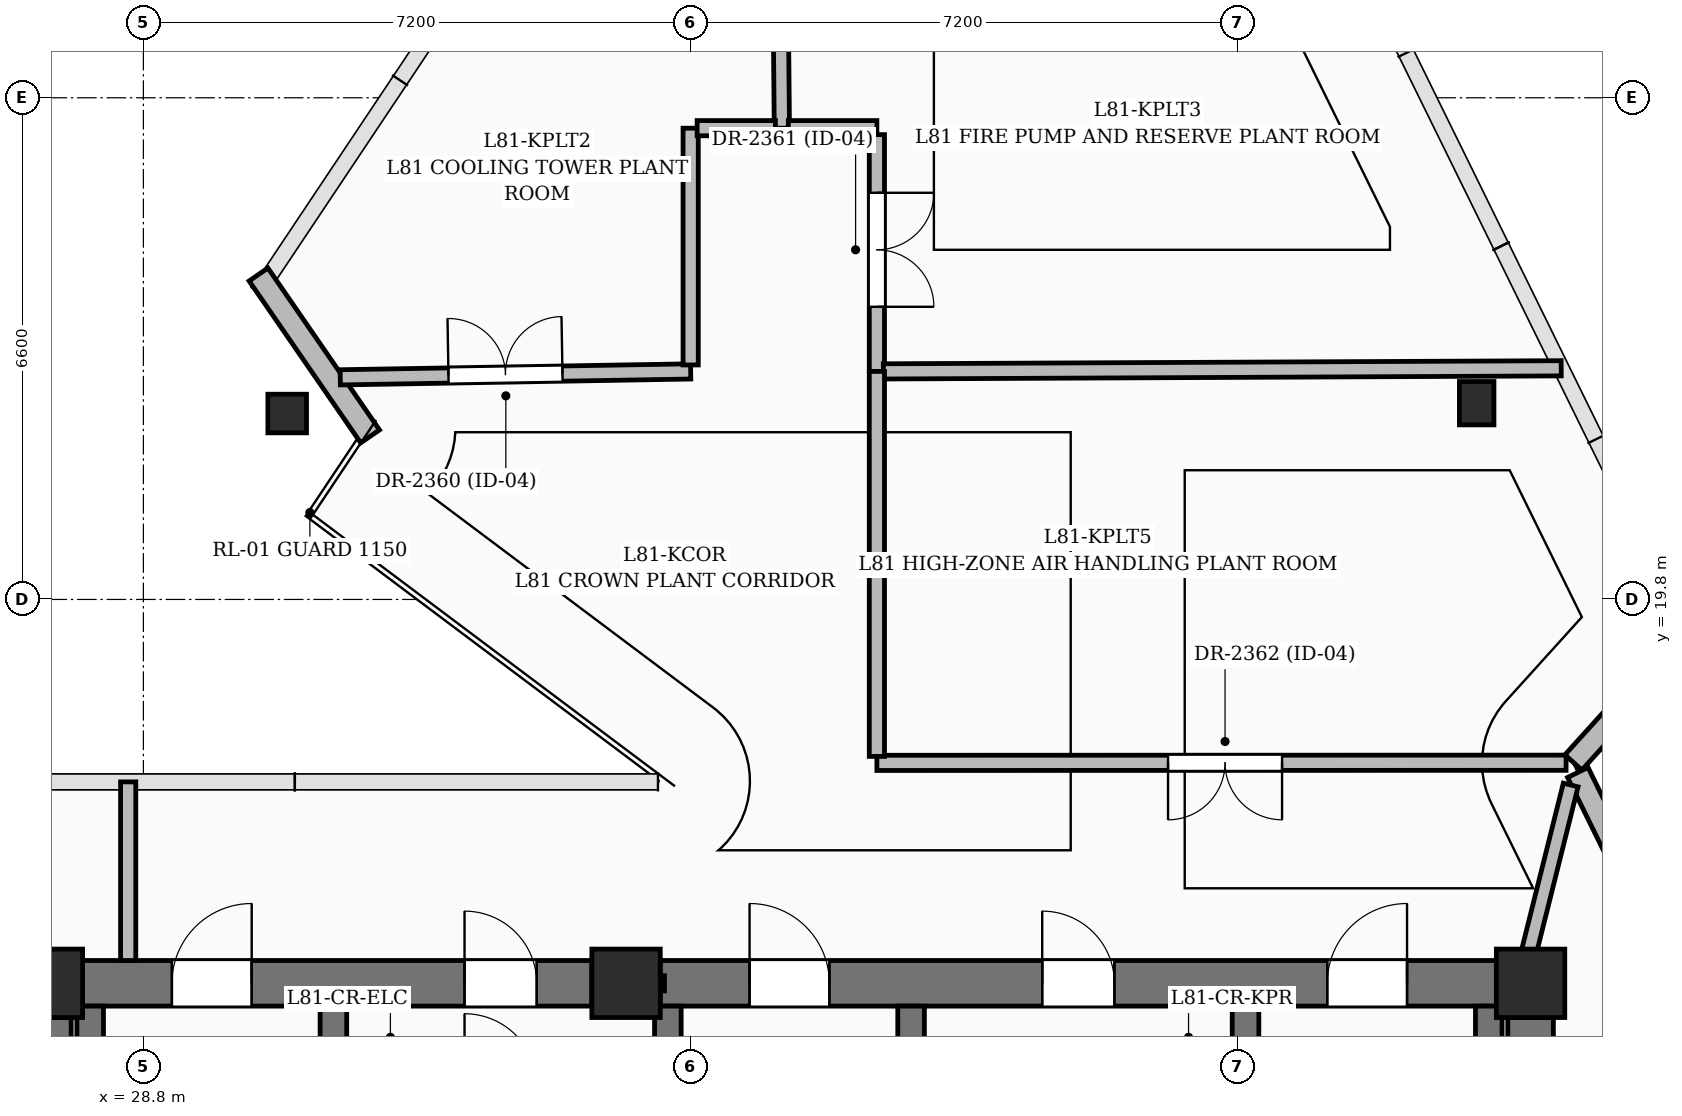
"""IFC4 building model, lengths in metres.
Left out: names, types, materials, properties, quantities, classifications, styles, units other than length and angle.
Written with IfcOpenShell. Run it as: python <this file> out.ifc"""

import sys

from ifc_helpers import new_model, si_unit, direction, frame, frame_2d, origin, origin_2d, place, context, subcontext, project, spatial, rectangle, hollow_circle, i_section, extrude, element, fill, save


model = new_model("IFC4")
c1 = context("Model", 3, precision=1e-05, world=origin(), true_north=direction((0.0, 1.0)))
c2 = subcontext(c1, "Body", "Model", "MODEL_VIEW")
j1 = project(units=[si_unit("LENGTHUNIT", "METRE"), si_unit("PLANEANGLEUNIT", "RADIAN")], contexts=[c1])
p1 = place(None, origin())
s1 = spatial("IfcSite", under=j1, at=p1, CompositionType="ELEMENT")
p2 = place(p1, origin())
s2 = spatial("IfcBuilding", under=s1, at=p2, CompositionType="ELEMENT")
p3 = place(p2, frame((0.0, 0.0, 314.5)))
s3 = spatial("IfcBuildingStorey", under=s2, at=p3, CompositionType="ELEMENT", Elevation=314.5)
for number, where, z_axis, x_axis in (
    (1, (27.55, 14.75, 0.0), (0.0, 0.0, 1.0), (1.0, 0.0, 0.0)),
    (2, (35.15, 14.75, 0.0), (0.0, 0.0, 1.0), (1.0, 0.0, 0.0)),
    (3, (47.05, 14.75, 0.0), (0.0, 0.0, 1.0), (1.0, 0.0, 0.0)),
):
    element("IfcColumn", number, at=place(p3, frame(where, z_axis=z_axis, x_axis=x_axis)), inside=s3, PredefinedType="COLUMN", context=c2, shape_type="SweptSolid", body=[
        extrude(rectangle(XDim=0.9, YDim=0.9, at=origin_2d()), origin(), (0.0, 0.0, 1.0), 4.0),
    ])
p4 = place(p3, frame((28.0, 14.75, 0.0), z_axis=(0.0, 0.0, 1.0), x_axis=(1.0, 0.0, 0.0)))
e4 = element("IfcWall", 4, at=p4, inside=s3, PredefinedType="SHEAR", context=c2, shape_type="SweptSolid", body=[
    extrude(rectangle(XDim=6.7, YDim=0.6, at=frame_2d((3.35, 0.0))), origin(), (0.0, 0.0, 1.0), 4.0),
])
p5 = place(p4, frame((1.175, 0.0, 0.0)))
e5 = element("IfcOpeningElement", 5, at=p5, cuts=e4, PredefinedType="OPENING", context=c2, shape_type="SweptSolid", body=[
    extrude(rectangle(XDim=1.05, YDim=2.15, at=frame_2d((0.525, 1.075))), frame((0.0, 0.31, 0.0), z_axis=(0.0, -1.0, 0.0), x_axis=(1.0, 0.0, 0.0)), (0.0, 0.0, 1.0), 0.62),
])
p6 = place(p4, frame((5.025, 0.0, 0.0)))
e6 = element("IfcOpeningElement", 6, at=p6, cuts=e4, PredefinedType="OPENING", context=c2, shape_type="SweptSolid", body=[
    extrude(rectangle(XDim=0.95, YDim=2.15, at=frame_2d((0.475, 1.075))), frame((0.0, 0.31, 0.0), z_axis=(0.0, -1.0, 0.0), x_axis=(1.0, 0.0, 0.0)), (0.0, 0.0, 1.0), 0.62),
])
p7 = place(p3, frame((35.6, 14.75, 0.0), z_axis=(0.0, 0.0, 1.0), x_axis=(1.0, 0.0, 0.0)))
e7 = element("IfcWall", 7, at=p7, inside=s3, PredefinedType="SHEAR", context=c2, shape_type="SweptSolid", body=[
    extrude(rectangle(XDim=11.0, YDim=0.6, at=frame_2d((5.5, 0.0))), origin(), (0.0, 0.0, 1.0), 4.0),
])
p8 = place(p7, frame((1.175, 0.0, 0.0)))
e8 = element("IfcOpeningElement", 8, at=p8, cuts=e7, PredefinedType="OPENING", context=c2, shape_type="SweptSolid", body=[
    extrude(rectangle(XDim=1.05, YDim=2.15, at=frame_2d((0.525, 1.075))), frame((0.0, 0.31, 0.0), z_axis=(0.0, -1.0, 0.0), x_axis=(1.0, 0.0, 0.0)), (0.0, 0.0, 1.0), 0.62),
])
p9 = place(p7, frame((8.775, 0.0, 0.0)))
e9 = element("IfcOpeningElement", 9, at=p9, cuts=e7, PredefinedType="OPENING", context=c2, shape_type="SweptSolid", body=[
    extrude(rectangle(XDim=1.05, YDim=2.15, at=frame_2d((0.525, 1.075))), frame((0.0, 0.31, 0.0), z_axis=(0.0, -1.0, 0.0), x_axis=(1.0, 0.0, 0.0)), (0.0, 0.0, 1.0), 0.62),
])
p10 = place(p7, frame((5.025, 0.0, 0.0)))
e10 = element("IfcOpeningElement", 10, at=p10, cuts=e7, PredefinedType="OPENING", context=c2, shape_type="SweptSolid", body=[
    extrude(rectangle(XDim=0.95, YDim=2.15, at=frame_2d((0.475, 1.075))), frame((0.0, 0.31, 0.0), z_axis=(0.0, -1.0, 0.0), x_axis=(1.0, 0.0, 0.0)), (0.0, 0.0, 1.0), 0.62),
])
for number, where, z_axis, x_axis in (
    (11, (27.55, 5.0, 0.0), (0.0, 0.0, 1.0), (0.0, 1.0, 0.0)),
    (12, (47.05, 5.0, 0.0), (0.0, 0.0, 1.0), (0.0, 1.0, 0.0)),
):
    element("IfcWall", number, at=place(p3, frame(where, z_axis=z_axis, x_axis=x_axis)), inside=s3, PredefinedType="SHEAR", context=c2, shape_type="SweptSolid", body=[
        extrude(rectangle(XDim=9.3, YDim=0.6, at=frame_2d((4.65, 0.0))), origin(), (0.0, 0.0, 1.0), 4.0),
    ])
p11 = place(p3, frame((28.1, 5.2, 0.0), z_axis=(0.0, 0.0, 1.0), x_axis=(0.0, 1.0, 0.0)))
e13 = element("IfcWall", 13, at=p11, inside=s3, PredefinedType="SOLIDWALL", context=c2, shape_type="SweptSolid", body=[
    extrude(rectangle(XDim=9.25, YDim=0.35, at=frame_2d((4.625, 0.0))), origin(), (0.0, 0.0, 1.0), 4.0),
])
p12 = place(p3, frame((31.3, 5.2, 0.0), z_axis=(0.0, 0.0, 1.0), x_axis=(0.0, 1.0, 0.0)))
e14 = element("IfcWall", 14, at=p12, inside=s3, PredefinedType="SOLIDWALL", context=c2, shape_type="SweptSolid", body=[
    extrude(rectangle(XDim=9.25, YDim=0.35, at=frame_2d((4.625, 0.0))), origin(), (0.0, 0.0, 1.0), 4.0),
])
p13 = place(p12, frame((6.95, 0.0, 0.0)))
e15 = element("IfcOpeningElement", 15, at=p13, cuts=e14, PredefinedType="OPENING", context=c2, shape_type="SweptSolid", body=[
    extrude(rectangle(XDim=1.0, YDim=2.15, at=frame_2d((0.5, 1.075))), frame((0.0, 0.185, 0.0), z_axis=(0.0, -1.0, 0.0), x_axis=(1.0, 0.0, 0.0)), (0.0, 0.0, 1.0), 0.37),
])
p14 = place(p3, frame((35.7, 5.2, 0.0), z_axis=(0.0, 0.0, 1.0), x_axis=(0.0, 1.0, 0.0)))
e16 = element("IfcWall", 16, at=p14, inside=s3, PredefinedType="SOLIDWALL", context=c2, shape_type="SweptSolid", body=[
    extrude(rectangle(XDim=9.25, YDim=0.35, at=frame_2d((4.625, 0.0))), origin(), (0.0, 0.0, 1.0), 4.0),
])
p15 = place(p14, frame((6.95, 0.0, 0.0)))
e17 = element("IfcOpeningElement", 17, at=p15, cuts=e16, PredefinedType="OPENING", context=c2, shape_type="SweptSolid", body=[
    extrude(rectangle(XDim=1.0, YDim=2.15, at=frame_2d((0.5, 1.075))), frame((0.0, 0.185, 0.0), z_axis=(0.0, -1.0, 0.0), x_axis=(1.0, 0.0, 0.0)), (0.0, 0.0, 1.0), 0.37),
])
p16 = place(p3, frame((38.9, 5.2, 0.0), z_axis=(0.0, 0.0, 1.0), x_axis=(0.0, 1.0, 0.0)))
e18 = element("IfcWall", 18, at=p16, inside=s3, PredefinedType="SOLIDWALL", context=c2, shape_type="SweptSolid", body=[
    extrude(rectangle(XDim=9.25, YDim=0.35, at=frame_2d((4.625, 0.0))), origin(), (0.0, 0.0, 1.0), 4.0),
])
p17 = place(p16, frame((6.95, 0.0, 0.0)))
e19 = element("IfcOpeningElement", 19, at=p17, cuts=e18, PredefinedType="OPENING", context=c2, shape_type="SweptSolid", body=[
    extrude(rectangle(XDim=1.0, YDim=2.15, at=frame_2d((0.5, 1.075))), frame((0.0, 0.185, 0.0), z_axis=(0.0, -1.0, 0.0), x_axis=(1.0, 0.0, 0.0)), (0.0, 0.0, 1.0), 0.37),
])
p18 = place(p3, frame((43.3, 5.2, 0.0), z_axis=(0.0, 0.0, 1.0), x_axis=(0.0, 1.0, 0.0)))
e20 = element("IfcWall", 20, at=p18, inside=s3, PredefinedType="SOLIDWALL", context=c2, shape_type="SweptSolid", body=[
    extrude(rectangle(XDim=9.25, YDim=0.35, at=frame_2d((4.625, 0.0))), origin(), (0.0, 0.0, 1.0), 4.0),
])
p19 = place(p18, frame((6.95, 0.0, 0.0)))
e21 = element("IfcOpeningElement", 21, at=p19, cuts=e20, PredefinedType="OPENING", context=c2, shape_type="SweptSolid", body=[
    extrude(rectangle(XDim=1.0, YDim=2.15, at=frame_2d((0.5, 1.075))), frame((0.0, 0.185, 0.0), z_axis=(0.0, -1.0, 0.0), x_axis=(1.0, 0.0, 0.0)), (0.0, 0.0, 1.0), 0.37),
])
p20 = place(p3, frame((46.5, 5.2, 0.0), z_axis=(0.0, 0.0, 1.0), x_axis=(0.0, 1.0, 0.0)))
e22 = element("IfcWall", 22, at=p20, inside=s3, PredefinedType="SOLIDWALL", context=c2, shape_type="SweptSolid", body=[
    extrude(rectangle(XDim=9.25, YDim=0.35, at=frame_2d((4.625, 0.0))), origin(), (0.0, 0.0, 1.0), 4.0),
])
p21 = place(p3, frame((46.341, 22.382, 0.0), z_axis=(0.0, 0.0, 1.0), x_axis=(1.0, 0.0, 0.0)))
e23 = element("IfcColumn", 23, at=p21, inside=s3, PredefinedType="COLUMN", context=c2, shape_type="SweptSolid", body=[
    extrude(i_section(OverallWidth=0.454, OverallDepth=0.57, WebThickness=0.078, FlangeThickness=0.094, FilletRadius=0.02, at=origin_2d()), origin(), (0.0, 0.0, 1.0), 4.0),
])
p22 = place(p3, frame((30.692, 22.246, 0.0), z_axis=(0.0, 0.0, 1.0), x_axis=(1.0, 0.0, 0.0)))
e24 = element("IfcColumn", 24, at=p22, inside=s3, PredefinedType="COLUMN", context=c2, shape_type="SweptSolid", body=[
    extrude(hollow_circle(Radius=0.254, WallThickness=0.016, at=origin_2d()), origin(), (0.0, 0.0, 1.0), 1.718),
])
p23 = place(p3, frame((31.783, 21.945, 0.0), z_axis=(0.0, 0.0, 1.0), x_axis=(-0.567505768613, 0.823369420486, 0.0)))
e25 = element("IfcWall", 25, at=p23, inside=s3, PredefinedType="SOLIDWALL", context=c2, shape_type="SweptSolid", body=[
    extrude(rectangle(XDim=2.587, YDim=0.3, at=frame_2d((1.293, 0.0))), origin(), (0.0, 0.0, 1.0), 2.3),
])
p24 = place(p3, frame((49.161, 19.367, 0.0), z_axis=(0.0, 0.0, 1.0), x_axis=(-0.670816319877, -0.741623533193, 0.0)))
e26 = element("IfcWall", 26, at=p24, inside=s3, PredefinedType="SOLIDWALL", context=c2, shape_type="SweptSolid", body=[
    extrude(rectangle(XDim=2.307, YDim=0.3, at=frame_2d((1.153, 0.0))), origin(), (0.0, 0.0, 1.0), 2.982),
])
p25 = place(p3, frame((47.671, 17.524, 0.0), z_axis=(0.0, 0.0, 1.0), x_axis=(0.441367806259, -0.8973262838, 0.0)))
e27 = element("IfcWall", 27, at=p25, inside=s3, PredefinedType="SOLIDWALL", context=c2, shape_type="SweptSolid", body=[
    extrude(rectangle(XDim=1.941, YDim=0.3, at=frame_2d((0.97, 0.0))), origin(), (0.0, 0.0, 1.0), 3.04),
])
p26 = place(p3, frame((34.72, 14.75, 0.0), z_axis=(0.0, 0.0, 1.0), x_axis=(1.0, 0.0, 0.0)))
e28 = element("IfcWall", 28, at=p26, inside=s3, PredefinedType="PARTITIONING", context=c2, shape_type="SweptSolid", body=[
    extrude(rectangle(XDim=0.935, YDim=0.2, at=frame_2d((0.468, 0.0))), origin(), (0.0, 0.0, 1.0), 2.885),
])
p27 = place(p3, frame((37.2, 26.0, 0.0), z_axis=(0.0, 0.0, 1.0), x_axis=(-0.009442134329, 0.999955422056, 0.0)))
e29 = element("IfcWall", 29, at=p27, inside=s3, PredefinedType="PARTITIONING", context=c2, shape_type="SweptSolid", body=[
    extrude(rectangle(XDim=8.041, YDim=0.2, at=frame_2d((4.021, 0.0))), origin(), (0.0, 0.0, 1.0), 2.977),
])
p28 = place(p3, frame((31.39, 22.722, 0.0), z_axis=(0.0, 0.0, 1.0), x_axis=(0.999856439671, 0.016944026939, 0.0)))
e30 = element("IfcWall", 30, at=p28, inside=s3, PredefinedType="PARTITIONING", context=c2, shape_type="SweptSolid", body=[
    extrude(rectangle(XDim=4.611, YDim=0.2, at=frame_2d((2.305, 0.0))), origin(), (0.0, 0.0, 1.0), 3.035),
])
p29 = place(p28, frame((1.424, 0.0, 0.0)))
e31 = element("IfcOpeningElement", 31, at=p29, cuts=e30, PredefinedType="OPENING", context=c2, shape_type="SweptSolid", body=[
    extrude(rectangle(XDim=1.5, YDim=2.2, at=frame_2d((0.75, 1.1))), frame((0.0, 0.11, 0.0), z_axis=(0.0, -1.0, 0.0), x_axis=(1.0, 0.0, 0.0)), (0.0, 0.0, 1.0), 0.22),
])
p30 = place(p3, frame((36.0, 22.885, 0.0), z_axis=(0.0, 0.0, 1.0), x_axis=(0.0, 1.0, 0.0)))
e32 = element("IfcWall", 32, at=p30, inside=s3, PredefinedType="PARTITIONING", context=c2, shape_type="SweptSolid", body=[
    extrude(rectangle(XDim=3.115, YDim=0.2, at=frame_2d((1.558, 0.0))), origin(), (0.0, 0.0, 1.0), 3.7),
])
p31 = place(p3, frame((36.085, 26.0, 0.0), z_axis=(0.0, 0.0, 1.0), x_axis=(1.0, 0.0, 0.0)))
e33 = element("IfcWall", 33, at=p31, inside=s3, PredefinedType="PARTITIONING", context=c2, shape_type="SweptSolid", body=[
    extrude(rectangle(XDim=1.03, YDim=0.2, at=frame_2d((0.515, 0.0))), origin(), (0.0, 0.0, 1.0), 3.7),
])
p32 = place(p3, frame((37.285, 26.0, 0.0), z_axis=(0.0, 0.0, 1.0), x_axis=(1.0, 0.0, 0.0)))
e34 = element("IfcWall", 34, at=p32, inside=s3, PredefinedType="PARTITIONING", context=c2, shape_type="SweptSolid", body=[
    extrude(rectangle(XDim=1.165, YDim=0.2, at=frame_2d((0.583, 0.0))), origin(), (0.0, 0.0, 1.0), 3.7),
])
p33 = place(p3, frame((38.45, 25.915, 0.0), z_axis=(0.0, 0.0, 1.0), x_axis=(0.0, -1.0, 0.0)))
e35 = element("IfcWall", 35, at=p33, inside=s3, PredefinedType="PARTITIONING", context=c2, shape_type="SweptSolid", body=[
    extrude(rectangle(XDim=3.115, YDim=0.2, at=frame_2d((1.558, 0.0))), origin(), (0.0, 0.0, 1.0), 3.7),
])
p34 = place(p33, frame((0.765, 0.0, 0.0)))
e36 = element("IfcOpeningElement", 36, at=p34, cuts=e35, PredefinedType="OPENING", context=c2, shape_type="SweptSolid", body=[
    extrude(rectangle(XDim=1.5, YDim=2.2, at=frame_2d((0.75, 1.1))), frame((0.0, 0.11, 0.0), z_axis=(0.0, -1.0, 0.0), x_axis=(1.0, 0.0, 0.0)), (0.0, 0.0, 1.0), 0.22),
])
p35 = place(p3, frame((38.535, 22.8, 0.0), z_axis=(0.0, 0.0, 1.0), x_axis=(0.999989549325, 0.004571787526, 0.0)))
e37 = element("IfcWall", 37, at=p35, inside=s3, PredefinedType="PARTITIONING", context=c2, shape_type="SweptSolid", body=[
    extrude(rectangle(XDim=8.918, YDim=0.2, at=frame_2d((4.459, 0.0))), origin(), (0.0, 0.0, 1.0), 2.977),
])
p36 = place(p3, frame((28.6, 17.4, 0.0), z_axis=(0.0, 0.0, 1.0), x_axis=(0.0, -1.0, 0.0)))
e38 = element("IfcWall", 38, at=p36, inside=s3, PredefinedType="PARTITIONING", context=c2, shape_type="SweptSolid", body=[
    extrude(rectangle(XDim=2.35, YDim=0.2, at=frame_2d((1.175, 0.0))), origin(), (0.0, 0.0, 1.0), 3.7),
])
p37 = place(p3, frame((47.0, 15.05, 0.0), z_axis=(0.0, 0.0, 1.0), x_axis=(0.242801110844, 0.970076090094, 0.0)))
e39 = element("IfcWall", 39, at=p37, inside=s3, PredefinedType="PARTITIONING", context=c2, shape_type="SweptSolid", body=[
    extrude(rectangle(XDim=2.38, YDim=0.2, at=frame_2d((1.19, 0.0))), origin(), (0.0, 0.0, 1.0), 3.035),
])
p38 = place(p3, frame((47.517, 17.652, 0.0), z_axis=(0.0, 0.0, 1.0), x_axis=(-0.999999970637, -0.000242332851, 0.0)))
e40 = element("IfcWall", 40, at=p38, inside=s3, PredefinedType="PARTITIONING", context=c2, shape_type="SweptSolid", body=[
    extrude(rectangle(XDim=9.067, YDim=0.2, at=frame_2d((4.534, 0.0))), origin(), (0.0, 0.0, 1.0), 3.035),
])
p39 = place(p38, frame((3.737, 0.0, 0.0)))
e41 = element("IfcOpeningElement", 41, at=p39, cuts=e40, PredefinedType="OPENING", context=c2, shape_type="SweptSolid", body=[
    extrude(rectangle(XDim=1.5, YDim=2.2, at=frame_2d((0.75, 1.1))), frame((0.0, 0.11, 0.0), z_axis=(0.0, -1.0, 0.0), x_axis=(1.0, 0.0, 0.0)), (0.0, 0.0, 1.0), 0.22),
])
p40 = place(p3, frame((38.45, 17.735, 0.0), z_axis=(0.0, 0.0, 1.0), x_axis=(0.0, 1.0, 0.0)))
e42 = element("IfcWall", 42, at=p40, inside=s3, PredefinedType="PARTITIONING", context=c2, shape_type="SweptSolid", body=[
    extrude(rectangle(XDim=5.065, YDim=0.2, at=frame_2d((2.532, 0.0))), origin(), (0.0, 0.0, 1.0), 3.035),
])
p41 = place(p5, origin())
e43 = element("IfcDoor", 43, at=p41, inside=s3, OperationType="SINGLE_SWING_RIGHT", PredefinedType="DOOR", context=c2, shape_type="SweptSolid", body=[
    extrude(rectangle(XDim=1.05, YDim=2.15, at=frame_2d((0.525, 1.075))), frame((0.0, 0.025, 0.0), z_axis=(0.0, -1.0, 0.0), x_axis=(1.0, 0.0, 0.0)), (0.0, 0.0, 1.0), 0.05),
])
fill(e5, e43)
p42 = place(p8, origin())
e44 = element("IfcDoor", 44, at=p42, inside=s3, OperationType="SINGLE_SWING_LEFT", PredefinedType="DOOR", context=c2, shape_type="SweptSolid", body=[
    extrude(rectangle(XDim=1.05, YDim=2.15, at=frame_2d((0.525, 1.075))), frame((0.0, 0.025, 0.0), z_axis=(0.0, -1.0, 0.0), x_axis=(1.0, 0.0, 0.0)), (0.0, 0.0, 1.0), 0.05),
])
fill(e8, e44)
p43 = place(p9, origin())
e45 = element("IfcDoor", 45, at=p43, inside=s3, OperationType="SINGLE_SWING_RIGHT", PredefinedType="DOOR", context=c2, shape_type="SweptSolid", body=[
    extrude(rectangle(XDim=1.05, YDim=2.15, at=frame_2d((0.525, 1.075))), frame((0.0, 0.025, 0.0), z_axis=(0.0, -1.0, 0.0), x_axis=(1.0, 0.0, 0.0)), (0.0, 0.0, 1.0), 0.05),
])
fill(e9, e45)
p44 = place(p6, origin())
e46 = element("IfcDoor", 46, at=p44, inside=s3, OperationType="SINGLE_SWING_LEFT", PredefinedType="DOOR", context=c2, shape_type="SweptSolid", body=[
    extrude(rectangle(XDim=0.95, YDim=2.15, at=frame_2d((0.475, 1.075))), frame((0.0, 0.025, 0.0), z_axis=(0.0, -1.0, 0.0), x_axis=(1.0, 0.0, 0.0)), (0.0, 0.0, 1.0), 0.05),
])
fill(e6, e46)
p45 = place(p10, origin())
e47 = element("IfcDoor", 47, at=p45, inside=s3, OperationType="SINGLE_SWING_LEFT", PredefinedType="DOOR", context=c2, shape_type="SweptSolid", body=[
    extrude(rectangle(XDim=0.95, YDim=2.15, at=frame_2d((0.475, 1.075))), frame((0.0, 0.025, 0.0), z_axis=(0.0, -1.0, 0.0), x_axis=(1.0, 0.0, 0.0)), (0.0, 0.0, 1.0), 0.05),
])
fill(e10, e47)
p46 = place(p29, origin())
e48 = element("IfcDoor", 48, at=p46, inside=s3, OperationType="DOUBLE_DOOR_SINGLE_SWING", PredefinedType="DOOR", context=c2, shape_type="SweptSolid", body=[
    extrude(rectangle(XDim=1.5, YDim=2.2, at=frame_2d((0.75, 1.1))), frame((0.0, 0.025, 0.0), z_axis=(0.0, -1.0, 0.0), x_axis=(1.0, 0.0, 0.0)), (0.0, 0.0, 1.0), 0.05),
])
fill(e31, e48)
p47 = place(p34, origin())
e49 = element("IfcDoor", 49, at=p47, inside=s3, OperationType="DOUBLE_DOOR_SINGLE_SWING", PredefinedType="DOOR", context=c2, shape_type="SweptSolid", body=[
    extrude(rectangle(XDim=1.5, YDim=2.2, at=frame_2d((0.75, 1.1))), frame((0.0, 0.025, 0.0), z_axis=(0.0, -1.0, 0.0), x_axis=(1.0, 0.0, 0.0)), (0.0, 0.0, 1.0), 0.05),
])
fill(e36, e49)
p48 = place(p39, origin())
e50 = element("IfcDoor", 50, at=p48, inside=s3, OperationType="DOUBLE_DOOR_SINGLE_SWING", PredefinedType="DOOR", context=c2, shape_type="SweptSolid", body=[
    extrude(rectangle(XDim=1.5, YDim=2.2, at=frame_2d((0.75, 1.1))), frame((0.0, 0.025, 0.0), z_axis=(0.0, -1.0, 0.0), x_axis=(1.0, 0.0, 0.0)), (0.0, 0.0, 1.0), 0.05),
])
fill(e41, e50)
save(model, sys.argv[1])
